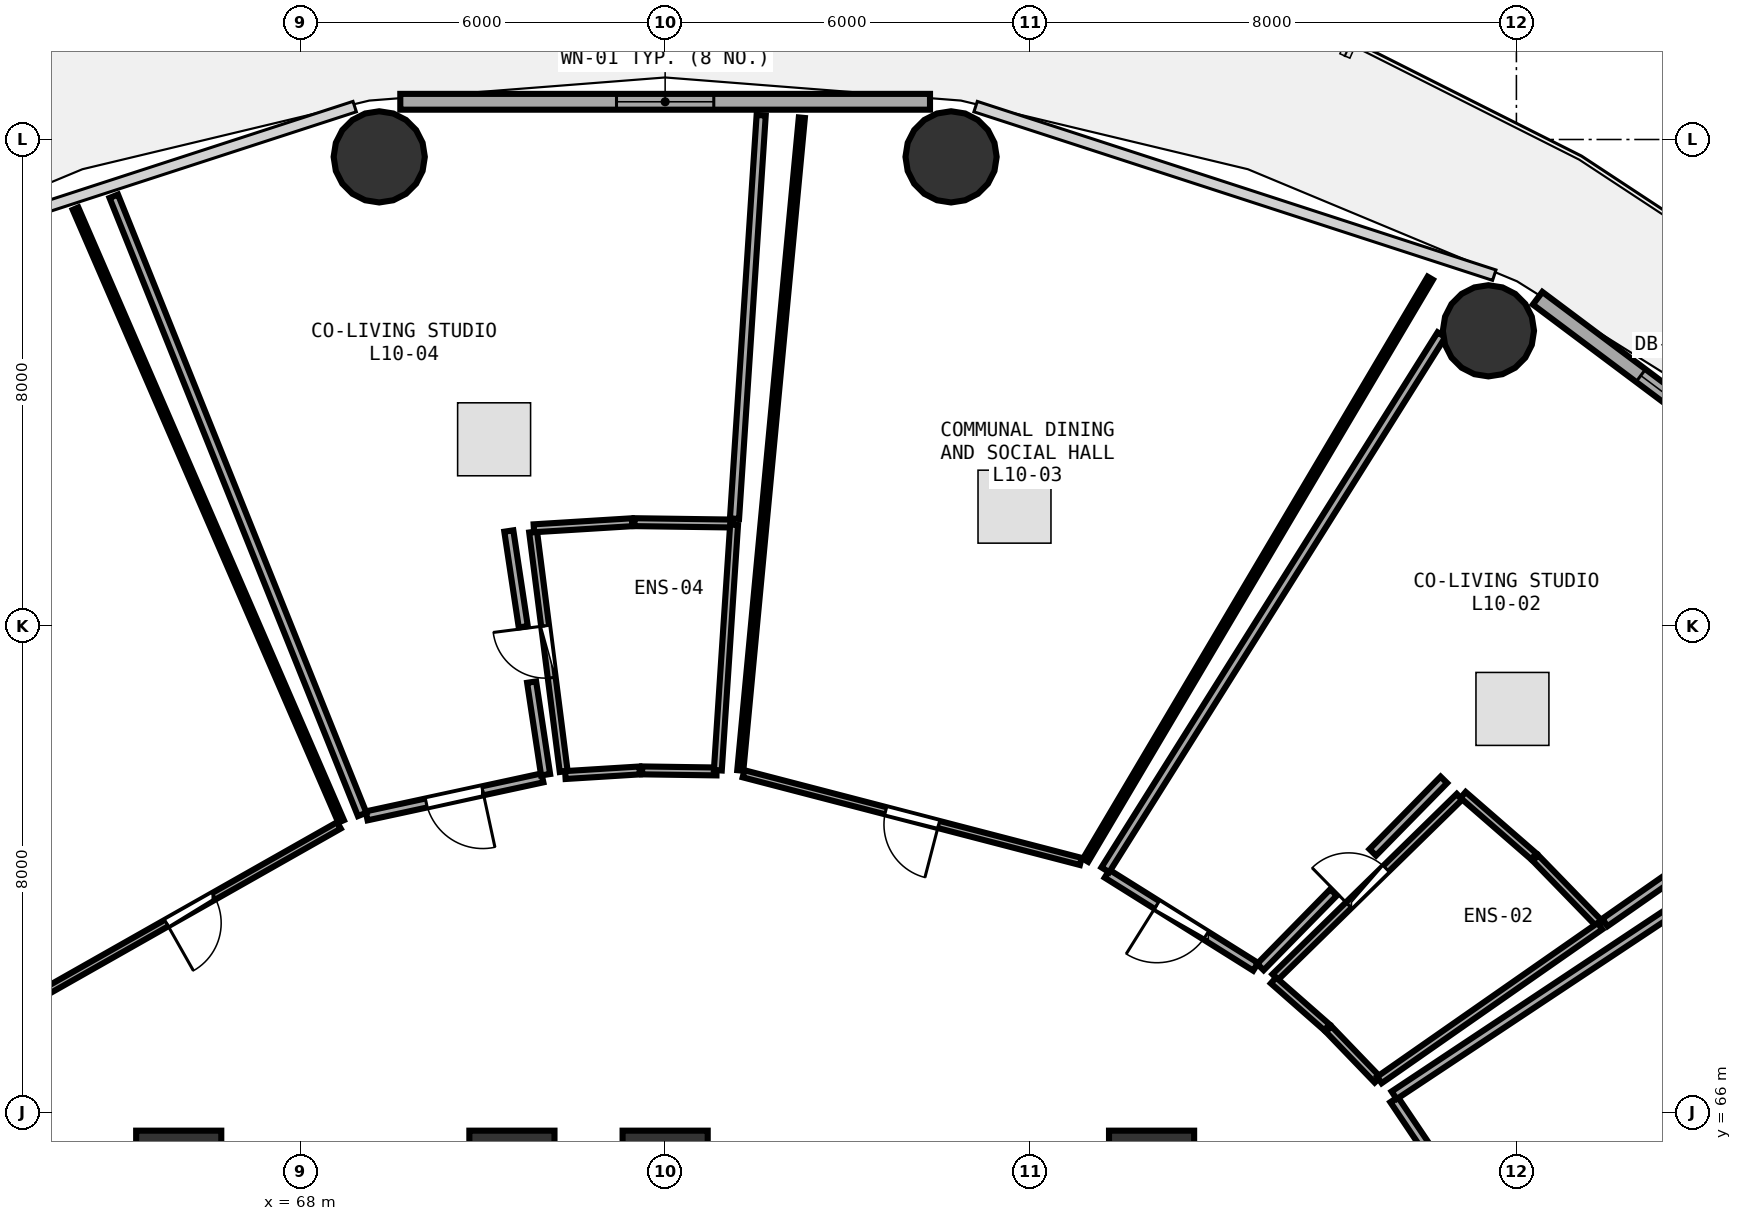
"""IFC4 building model, lengths in metres.
Left out: names, types, materials, properties, quantities, classifications, styles, units other than length and angle.
Written with IfcOpenShell. Run it as: python <this file> out.ifc"""

import sys

from ifc_helpers import new_model, si_unit, direction, frame, frame_2d, origin, origin_2d, place, context, subcontext, project, spatial, rectangle, circle, extrude, element, fill, save


model = new_model("IFC4")
c1 = context("Model", 3, precision=1e-05, world=origin(), true_north=direction((0.0, 1.0)))
c2 = subcontext(c1, "Body", "Model", "MODEL_VIEW")
j1 = project(units=[si_unit("LENGTHUNIT", "METRE"), si_unit("PLANEANGLEUNIT", "RADIAN")], contexts=[c1])
p1 = place(None, origin())
s1 = spatial("IfcSite", under=j1, at=p1, CompositionType="ELEMENT")
p2 = place(p1, origin())
s2 = spatial("IfcBuilding", under=s1, at=p2, CompositionType="ELEMENT")
p3 = place(p2, frame((0.0, 0.0, 41.25)))
s3 = spatial("IfcBuildingStorey", under=s2, at=p3, CompositionType="ELEMENT", Elevation=41.25)
for number, where, z_axis, x_axis in (
    (1, (82.0, 65.0, 0.0), (0.0, 0.0, 1.0), (1.0, 0.0, 0.0)),
    (2, (74.0, 65.0, 0.0), (0.0, 0.0, 1.0), (1.0, 0.0, 0.0)),
    (3, (71.48, 65.0, 0.0), (0.0, 0.0, 1.0), (1.0, 0.0, 0.0)),
    (4, (66.0, 65.0, 0.0), (0.0, 0.0, 1.0), (1.0, 0.0, 0.0)),
):
    element("IfcColumn", number, at=place(p3, frame(where, z_axis=z_axis, x_axis=x_axis)), inside=s3, PredefinedType="PILASTER", context=c2, shape_type="SweptSolid", body=[
        extrude(rectangle(XDim=1.4, YDim=1.4, at=origin_2d()), origin(), (0.0, 0.0, 1.0), 3.75),
    ])
for number, where, z_axis, x_axis in (
    (5, (87.54, 78.854, 0.0), (0.0, 0.0, 1.0), (1.0, 0.0, 0.0)),
    (6, (78.702, 81.714, 0.0), (0.0, 0.0, 1.0), (1.0, 0.0, 0.0)),
    (7, (69.298, 81.714, 0.0), (0.0, 0.0, 1.0), (1.0, 0.0, 0.0)),
):
    element("IfcColumn", number, at=place(p3, frame(where, z_axis=z_axis, x_axis=x_axis)), inside=s3, PredefinedType="COLUMN", context=c2, shape_type="SweptSolid", body=[
        extrude(circle(Radius=0.75, at=origin_2d()), origin(), (0.0, 0.0, 1.0), 3.75),
    ])
p4 = place(p3, frame((94.984, 74.418, 0.0), z_axis=(0.0, 0.0, 1.0), x_axis=(-0.80030733173, 0.599590005569, 0.0)))
e8 = element("IfcWall", 8, at=p4, inside=s3, PredefinedType="SOLIDWALL", context=c2, shape_type="SweptSolid", body=[
    extrude(rectangle(XDim=8.291, YDim=0.26, at=frame_2d((4.145, 0.0))), origin(), (0.0, 0.0, 1.0), 3.475),
])
p5 = place(p4, frame((3.67, 0.0, 0.0)))
e9 = element("IfcOpeningElement", 9, at=p5, cuts=e8, PredefinedType="OPENING", context=c2, shape_type="SweptSolid", body=[
    extrude(rectangle(XDim=0.95, YDim=2.1, at=frame_2d((0.475, 1.05))), frame((0.0, 0.14, 0.0), z_axis=(0.0, -1.0, 0.0), x_axis=(1.0, 0.0, 0.0)), (0.0, 0.0, 1.0), 0.28),
])
p6 = place(p4, frame((4.97, 0.0, 0.85)))
e10 = element("IfcOpeningElement", 10, at=p6, cuts=e8, PredefinedType="OPENING", context=c2, shape_type="SweptSolid", body=[
    extrude(rectangle(XDim=1.2, YDim=1.45, at=frame_2d((0.6, 0.725))), frame((0.0, 0.14, 0.0), z_axis=(0.0, -1.0, 0.0), x_axis=(1.0, 0.0, 0.0)), (0.0, 0.0, 1.0), 0.28),
])
p7 = place(p3, frame((78.356, 82.62, 0.0), z_axis=(0.0, 0.0, 1.0), x_axis=(-1.0, 0.0, 0.0)))
e11 = element("IfcWall", 11, at=p7, inside=s3, PredefinedType="SOLIDWALL", context=c2, shape_type="SweptSolid", body=[
    extrude(rectangle(XDim=8.712, YDim=0.26, at=frame_2d((4.356, 0.0))), origin(), (0.0, 0.0, 1.0), 3.475),
])
p8 = place(p7, frame((3.556, 0.0, 0.85)))
e12 = element("IfcOpeningElement", 12, at=p8, cuts=e11, PredefinedType="OPENING", context=c2, shape_type="SweptSolid", body=[
    extrude(rectangle(XDim=1.6, YDim=1.45, at=frame_2d((0.8, 0.725))), frame((0.0, 0.14, 0.0), z_axis=(0.0, -1.0, 0.0), x_axis=(1.0, 0.0, 0.0)), (0.0, 0.0, 1.0), 0.28),
])
p9 = place(p3, frame((87.533, 63.917, 0.0), z_axis=(0.0, 0.0, 1.0), x_axis=(-0.558444152287, 0.829542119953, 0.0)))
e13 = element("IfcWall", 13, at=p9, inside=s3, PredefinedType="PARTITIONING", context=c2, shape_type="SweptSolid", body=[
    extrude(rectangle(XDim=2.765, YDim=0.15, at=frame_2d((1.382, 0.0))), origin(), (0.0, 0.0, 1.0), 2.875),
])
p10 = place(p9, frame((0.907, 0.0, 0.0)))
e14 = element("IfcOpeningElement", 14, at=p10, cuts=e13, PredefinedType="OPENING", context=c2, shape_type="SweptSolid", body=[
    extrude(rectangle(XDim=0.95, YDim=2.08, at=frame_2d((0.475, 1.04))), frame((0.0, 0.085, 0.0), z_axis=(0.0, -1.0, 0.0), x_axis=(1.0, 0.0, 0.0)), (0.0, 0.0, 1.0), 0.17),
])
p11 = place(p3, frame((84.033, 68.226, 0.0), z_axis=(0.0, 0.0, 1.0), x_axis=(0.714891568972, 0.699235328493, 0.0)))
e15 = element("IfcWall", 15, at=p11, inside=s3, PredefinedType="PLUMBINGWALL", context=c2, shape_type="SweptSolid", body=[
    extrude(rectangle(XDim=4.241, YDim=0.13, at=frame_2d((2.121, 0.0))), origin(), (0.0, 0.0, 1.0), 3.235),
])
p12 = place(p11, frame((1.691, 0.0, 0.0)))
e16 = element("IfcOpeningElement", 16, at=p12, cuts=e15, PredefinedType="OPENING", context=c2, shape_type="SweptSolid", body=[
    extrude(rectangle(XDim=0.86, YDim=2.05, at=frame_2d((0.43, 1.025))), frame((0.0, 0.075, 0.0), z_axis=(0.0, -1.0, 0.0), x_axis=(1.0, 0.0, 0.0)), (0.0, 0.0, 1.0), 0.15),
])
p13 = place(p3, frame((83.711, 68.395, 0.0), z_axis=(0.0, 0.0, 1.0), x_axis=(-0.847522016495, 0.530760239238, 0.0)))
e17 = element("IfcWall", 17, at=p13, inside=s3, PredefinedType="PARTITIONING", context=c2, shape_type="SweptSolid", body=[
    extrude(rectangle(XDim=2.882, YDim=0.15, at=frame_2d((1.441, 0.0))), origin(), (0.0, 0.0, 1.0), 2.875),
])
p14 = place(p13, frame((0.966, 0.0, 0.0)))
e18 = element("IfcOpeningElement", 18, at=p14, cuts=e17, PredefinedType="OPENING", context=c2, shape_type="SweptSolid", body=[
    extrude(rectangle(XDim=0.95, YDim=2.08, at=frame_2d((0.475, 1.04))), frame((0.0, 0.085, 0.0), z_axis=(0.0, -1.0, 0.0), x_axis=(1.0, 0.0, 0.0)), (0.0, 0.0, 1.0), 0.17),
])
p15 = place(p3, frame((80.836, 70.127, 0.0), z_axis=(0.0, 0.0, 1.0), x_axis=(-0.967834541954, 0.251587558119, 0.0)))
e19 = element("IfcWall", 19, at=p15, inside=s3, PredefinedType="PARTITIONING", context=c2, shape_type="SweptSolid", body=[
    extrude(rectangle(XDim=5.73, YDim=0.12, at=frame_2d((2.865, 0.0))), origin(), (0.0, 0.0, 1.0), 2.875),
])
p16 = place(p15, frame((2.415, 0.0, 0.0)))
e20 = element("IfcOpeningElement", 20, at=p16, cuts=e19, PredefinedType="OPENING", context=c2, shape_type="SweptSolid", body=[
    extrude(rectangle(XDim=0.9, YDim=2.08, at=frame_2d((0.45, 1.04))), frame((0.0, 0.07, 0.0), z_axis=(0.0, -1.0, 0.0), x_axis=(1.0, 0.0, 0.0)), (0.0, 0.0, 1.0), 0.14),
])
p17 = place(p3, frame((72.331, 71.606, 0.0), z_axis=(0.0, 0.0, 1.0), x_axis=(-0.126591984802, 0.991954872655, 0.0)))
e21 = element("IfcWall", 21, at=p17, inside=s3, PredefinedType="PLUMBINGWALL", context=c2, shape_type="SweptSolid", body=[
    extrude(rectangle(XDim=3.971, YDim=0.13, at=frame_2d((1.985, 0.0))), origin(), (0.0, 0.0, 1.0), 3.175),
])
p18 = place(p17, frame((1.555, 0.0, 0.0)))
e22 = element("IfcOpeningElement", 22, at=p18, cuts=e21, PredefinedType="OPENING", context=c2, shape_type="SweptSolid", body=[
    extrude(rectangle(XDim=0.86, YDim=2.05, at=frame_2d((0.43, 1.025))), frame((0.0, 0.075, 0.0), z_axis=(0.0, -1.0, 0.0), x_axis=(1.0, 0.0, 0.0)), (0.0, 0.0, 1.0), 0.15),
])
p19 = place(p3, frame((71.981, 71.501, 0.0), z_axis=(0.0, 0.0, 1.0), x_axis=(-0.977451938751, -0.211158015313, 0.0)))
e23 = element("IfcWall", 23, at=p19, inside=s3, PredefinedType="PARTITIONING", context=c2, shape_type="SweptSolid", body=[
    extrude(rectangle(XDim=2.958, YDim=0.15, at=frame_2d((1.479, 0.0))), origin(), (0.0, 0.0, 1.0), 2.875),
])
p20 = place(p19, frame((1.004, 0.0, 0.0)))
e24 = element("IfcOpeningElement", 24, at=p20, cuts=e23, PredefinedType="OPENING", context=c2, shape_type="SweptSolid", body=[
    extrude(rectangle(XDim=0.95, YDim=2.08, at=frame_2d((0.475, 1.04))), frame((0.0, 0.085, 0.0), z_axis=(0.0, -1.0, 0.0), x_axis=(1.0, 0.0, 0.0)), (0.0, 0.0, 1.0), 0.17),
])
p21 = place(p3, frame((68.635, 70.72, 0.0), z_axis=(0.0, 0.0, 1.0), x_axis=(-0.870068136537, -0.49293147372, 0.0)))
e25 = element("IfcWall", 25, at=p21, inside=s3, PredefinedType="PARTITIONING", context=c2, shape_type="SweptSolid", body=[
    extrude(rectangle(XDim=5.621, YDim=0.12, at=frame_2d((2.811, 0.0))), origin(), (0.0, 0.0, 1.0), 2.875),
])
p22 = place(p21, frame((2.36, 0.0, 0.0)))
e26 = element("IfcOpeningElement", 26, at=p22, cuts=e25, PredefinedType="OPENING", context=c2, shape_type="SweptSolid", body=[
    extrude(rectangle(XDim=0.9, YDim=2.08, at=frame_2d((0.45, 1.04))), frame((0.0, 0.07, 0.0), z_axis=(0.0, -1.0, 0.0), x_axis=(1.0, 0.0, 0.0)), (0.0, 0.0, 1.0), 0.14),
])
p23 = place(p3, frame((85.989, 66.282, 0.0), z_axis=(0.0, 0.0, 1.0), x_axis=(0.833114362659, 0.553100767248, 0.0)))
e27 = element("IfcWall", 27, at=p23, inside=s3, PredefinedType="PARTITIONING", context=c2, shape_type="SweptSolid", body=[
    extrude(rectangle(XDim=11.808, YDim=0.15, at=frame_2d((5.904, 0.0))), origin(), (0.0, 0.0, 1.0), 2.875),
])
p24 = place(p3, frame((91.8, 65.626, 0.0), z_axis=(0.0, 0.0, 1.0), x_axis=(-0.92347379334, -0.383661508383, 0.0)))
e28 = element("IfcWall", 28, at=p24, inside=s3, PredefinedType="PARTITIONING", context=c2, shape_type="SweptSolid", body=[
    extrude(rectangle(XDim=1.8, YDim=0.15, at=frame_2d((0.9, 0.0))), origin(), (0.0, 0.0, 1.0), 2.875),
])
p25 = place(p3, frame((85.716, 66.536, 0.0), z_axis=(0.0, 0.0, 1.0), x_axis=(-0.693609314424, 0.720351385745, 0.0)))
e29 = element("IfcWall", 29, at=p25, inside=s3, PredefinedType="PLUMBINGWALL", context=c2, shape_type="SweptSolid", body=[
    extrude(rectangle(XDim=1.159, YDim=0.13, at=frame_2d((0.58, 0.0))), origin(), (0.0, 0.0, 1.0), 2.875),
])
p26 = place(p3, frame((84.883, 67.399, 0.0), z_axis=(0.0, 0.0, 1.0), x_axis=(-0.75116489845, 0.660114607729, 0.0)))
e30 = element("IfcWall", 30, at=p26, inside=s3, PredefinedType="PLUMBINGWALL", context=c2, shape_type="SweptSolid", body=[
    extrude(rectangle(XDim=1.169, YDim=0.13, at=frame_2d((0.584, 0.0))), origin(), (0.0, 0.0, 1.0), 3.48),
])
p27 = place(p3, frame((87.123, 71.221, 0.0), z_axis=(0.0, 0.0, 1.0), x_axis=(0.754783045921, -0.655974506814, 0.0)))
e31 = element("IfcWall", 31, at=p27, inside=s3, PredefinedType="PLUMBINGWALL", context=c2, shape_type="SweptSolid", body=[
    extrude(rectangle(XDim=1.539, YDim=0.13, at=frame_2d((0.77, 0.0))), origin(), (0.0, 0.0, 1.0), 3.48),
])
p28 = place(p3, frame((88.314, 70.184, 0.0), z_axis=(0.0, 0.0, 1.0), x_axis=(0.696872710474, -0.717194830849, 0.0)))
e32 = element("IfcWall", 32, at=p28, inside=s3, PredefinedType="PLUMBINGWALL", context=c2, shape_type="SweptSolid", body=[
    extrude(rectangle(XDim=1.526, YDim=0.13, at=frame_2d((0.763, 0.0))), origin(), (0.0, 0.0, 1.0), 2.875),
])
p29 = place(p3, frame((89.375, 69.064, 0.0), z_axis=(0.0, 0.0, 1.0), x_axis=(-0.820234155097, -0.572027910869, 0.0)))
e33 = element("IfcWall", 33, at=p29, inside=s3, PredefinedType="PLUMBINGWALL", context=c2, shape_type="SweptSolid", body=[
    extrude(rectangle(XDim=4.423, YDim=0.13, at=frame_2d((2.212, 0.0))), origin(), (0.0, 0.0, 1.0), 3.235),
])
p30 = place(p3, frame((81.239, 69.99, 0.0), z_axis=(0.0, 0.0, 1.0), x_axis=(0.531976191107, 0.846759311785, 0.0)))
e34 = element("IfcWall", 34, at=p30, inside=s3, PredefinedType="PARTITIONING", context=c2, shape_type="SweptSolid", body=[
    extrude(rectangle(XDim=10.392, YDim=0.15, at=frame_2d((5.196, 0.0))), origin(), (0.0, 0.0, 1.0), 3.175),
])
p31 = place(p3, frame((94.602, 72.717, 0.0), z_axis=(0.0, 0.0, 1.0), x_axis=(-0.819914684215, -0.572485729611, 0.0)))
e35 = element("IfcWall", 35, at=p31, inside=s3, PredefinedType="PARTITIONING", context=c2, shape_type="SweptSolid", body=[
    extrude(rectangle(XDim=6.277, YDim=0.15, at=frame_2d((3.139, 0.0))), origin(), (0.0, 0.0, 1.0), 3.175),
])
p32 = place(p3, frame((86.807, 71.469, 0.0), z_axis=(0.0, 0.0, 1.0), x_axis=(-0.699982262545, -0.714160228606, 0.0)))
e36 = element("IfcWall", 36, at=p32, inside=s3, PredefinedType="PARTITIONING", context=c2, shape_type="SweptSolid", body=[
    extrude(rectangle(XDim=1.67, YDim=0.15, at=frame_2d((0.835, 0.0))), origin(), (0.0, 0.0, 1.0), 3.48),
])
p33 = place(p3, frame((84.993, 69.619, 0.0), z_axis=(0.0, 0.0, 1.0), x_axis=(-0.69997059614, -0.714171663215, 0.0)))
e37 = element("IfcWall", 37, at=p33, inside=s3, PredefinedType="PARTITIONING", context=c2, shape_type="SweptSolid", body=[
    extrude(rectangle(XDim=1.719, YDim=0.15, at=frame_2d((0.86, 0.0))), origin(), (0.0, 0.0, 1.0), 3.235),
])
p34 = place(p3, frame((75.236, 71.624, 0.0), z_axis=(0.0, 0.0, 1.0), x_axis=(0.093901844858, 0.995581460018, 0.0)))
e38 = element("IfcWall", 38, at=p34, inside=s3, PredefinedType="PARTITIONING", context=c2, shape_type="SweptSolid", body=[
    extrude(rectangle(XDim=10.782, YDim=0.1, at=frame_2d((5.391, 0.0))), origin(), (0.0, 0.0, 1.0), 2.875),
])
p35 = place(p3, frame((86.583, 79.719, 0.0), z_axis=(0.0, 0.0, 1.0), x_axis=(-0.509594840762, -0.860414492131, 0.0)))
e39 = element("IfcWall", 39, at=p35, inside=s3, PredefinedType="PARTITIONING", context=c2, shape_type="SweptSolid", body=[
    extrude(rectangle(XDim=11.125, YDim=0.1, at=frame_2d((5.562, 0.0))), origin(), (0.0, 0.0, 1.0), 2.875),
])
p36 = place(p3, frame((74.845, 71.607, 0.0), z_axis=(0.0, 0.0, 1.0), x_axis=(-0.999899717313, 0.014161755422, 0.0)))
e40 = element("IfcWall", 40, at=p36, inside=s3, PredefinedType="PLUMBINGWALL", context=c2, shape_type="SweptSolid", body=[
    extrude(rectangle(XDim=1.224, YDim=0.13, at=frame_2d((0.612, 0.0))), origin(), (0.0, 0.0, 1.0), 3.48),
])
p37 = place(p3, frame((73.581, 71.624, 0.0), z_axis=(0.0, 0.0, 1.0), x_axis=(-0.998088101555, -0.061807293544, 0.0)))
e41 = element("IfcWall", 41, at=p37, inside=s3, PredefinedType="PLUMBINGWALL", context=c2, shape_type="SweptSolid", body=[
    extrude(rectangle(XDim=1.225, YDim=0.13, at=frame_2d((0.612, 0.0))), origin(), (0.0, 0.0, 1.0), 3.48),
])
p38 = place(p3, frame((71.841, 75.606, 0.0), z_axis=(0.0, 0.0, 1.0), x_axis=(0.99810332164, 0.061561021199, 0.0)))
e42 = element("IfcWall", 42, at=p38, inside=s3, PredefinedType="PLUMBINGWALL", context=c2, shape_type="SweptSolid", body=[
    extrude(rectangle(XDim=1.618, YDim=0.13, at=frame_2d((0.809, 0.0))), origin(), (0.0, 0.0, 1.0), 3.48),
])
p39 = place(p3, frame((73.496, 75.707, 0.0), z_axis=(0.0, 0.0, 1.0), x_axis=(0.999903766804, -0.013872891954, 0.0)))
e43 = element("IfcWall", 43, at=p39, inside=s3, PredefinedType="PLUMBINGWALL", context=c2, shape_type="SweptSolid", body=[
    extrude(rectangle(XDim=1.619, YDim=0.13, at=frame_2d((0.81, 0.0))), origin(), (0.0, 0.0, 1.0), 3.48),
])
p40 = place(p3, frame((75.134, 75.664, 0.0), z_axis=(0.0, 0.0, 1.0), x_axis=(-0.066134527356, -0.997810715663, 0.0)))
e44 = element("IfcWall", 44, at=p40, inside=s3, PredefinedType="PLUMBINGWALL", context=c2, shape_type="SweptSolid", body=[
    extrude(rectangle(XDim=4.046, YDim=0.13, at=frame_2d((2.023, 0.0))), origin(), (0.0, 0.0, 1.0), 3.175),
])
p41 = place(p3, frame((69.017, 70.901, 0.0), z_axis=(0.0, 0.0, 1.0), x_axis=(-0.372877076454, 0.927880749803, 0.0)))
e45 = element("IfcWall", 45, at=p41, inside=s3, PredefinedType="PARTITIONING", context=c2, shape_type="SweptSolid", body=[
    extrude(rectangle(XDim=10.956, YDim=0.15, at=frame_2d((5.478, 0.0))), origin(), (0.0, 0.0, 1.0), 2.875),
])
p42 = place(p3, frame((75.579, 82.399, 0.0), z_axis=(0.0, 0.0, 1.0), x_axis=(-0.065975596533, -0.997821236827, 0.0)))
e46 = element("IfcWall", 46, at=p42, inside=s3, PredefinedType="PARTITIONING", context=c2, shape_type="SweptSolid", body=[
    extrude(rectangle(XDim=6.65, YDim=0.15, at=frame_2d((3.325, 0.0))), origin(), (0.0, 0.0, 1.0), 2.875),
])
p43 = place(p3, frame((71.429, 75.561, 0.0), z_axis=(0.0, 0.0, 1.0), x_axis=(0.149314908759, -0.988789693526, 0.0)))
e47 = element("IfcWall", 47, at=p43, inside=s3, PredefinedType="PARTITIONING", context=c2, shape_type="SweptSolid", body=[
    extrude(rectangle(XDim=1.593, YDim=0.15, at=frame_2d((0.796, 0.0))), origin(), (0.0, 0.0, 1.0), 3.175),
])
p44 = place(p3, frame((71.804, 73.077, 0.0), z_axis=(0.0, 0.0, 1.0), x_axis=(0.149162041114, -0.988812765639, 0.0)))
e48 = element("IfcWall", 48, at=p44, inside=s3, PredefinedType="PARTITIONING", context=c2, shape_type="SweptSolid", body=[
    extrude(rectangle(XDim=1.54, YDim=0.15, at=frame_2d((0.77, 0.0))), origin(), (0.0, 0.0, 1.0), 3.48),
])
p45 = place(p3, frame((64.303, 80.863, 0.0), z_axis=(0.0, 0.0, 1.0), x_axis=(0.397730954589, -0.917502091421, 0.0)))
e49 = element("IfcWall", 49, at=p45, inside=s3, PredefinedType="PARTITIONING", context=c2, shape_type="SweptSolid", body=[
    extrude(rectangle(XDim=10.983, YDim=0.1, at=frame_2d((5.491, 0.0))), origin(), (0.0, 0.0, 1.0), 2.875),
])
p46 = place(p6, origin())
e50 = element("IfcWindow", 50, at=p46, inside=s3, PartitioningType="SINGLE_PANEL", PredefinedType="WINDOW", context=c2, shape_type="SweptSolid", body=[
    extrude(rectangle(XDim=1.2, YDim=1.45, at=frame_2d((0.6, 0.725))), frame((0.0, 0.03, 0.0), z_axis=(0.0, -1.0, 0.0), x_axis=(1.0, 0.0, 0.0)), (0.0, 0.0, 1.0), 0.06),
])
fill(e10, e50)
p47 = place(p8, origin())
e51 = element("IfcWindow", 51, at=p47, inside=s3, PartitioningType="SINGLE_PANEL", PredefinedType="WINDOW", context=c2, shape_type="SweptSolid", body=[
    extrude(rectangle(XDim=1.6, YDim=1.45, at=frame_2d((0.8, 0.725))), frame((0.0, 0.03, 0.0), z_axis=(0.0, -1.0, 0.0), x_axis=(1.0, 0.0, 0.0)), (0.0, 0.0, 1.0), 0.06),
])
fill(e12, e51)
p48 = place(p12, origin())
e52 = element("IfcDoor", 52, at=p48, inside=s3, OperationType="SINGLE_SWING_LEFT", PredefinedType="DOOR", context=c2, shape_type="SweptSolid", body=[
    extrude(rectangle(XDim=0.86, YDim=2.05, at=frame_2d((0.43, 1.025))), frame((0.0, 0.025, 0.0), z_axis=(0.0, -1.0, 0.0), x_axis=(1.0, 0.0, 0.0)), (0.0, 0.0, 1.0), 0.05),
])
fill(e16, e52)
p49 = place(p14, origin())
e53 = element("IfcDoor", 53, at=p49, inside=s3, OperationType="SINGLE_SWING_RIGHT", PredefinedType="DOOR", context=c2, shape_type="SweptSolid", body=[
    extrude(rectangle(XDim=0.95, YDim=2.08, at=frame_2d((0.475, 1.04))), frame((0.0, 0.025, 0.0), z_axis=(0.0, -1.0, 0.0), x_axis=(1.0, 0.0, 0.0)), (0.0, 0.0, 1.0), 0.05),
])
fill(e18, e53)
p50 = place(p16, origin())
e54 = element("IfcDoor", 54, at=p50, inside=s3, OperationType="SINGLE_SWING_LEFT", PredefinedType="DOOR", context=c2, shape_type="SweptSolid", body=[
    extrude(rectangle(XDim=0.9, YDim=2.08, at=frame_2d((0.45, 1.04))), frame((0.0, 0.025, 0.0), z_axis=(0.0, -1.0, 0.0), x_axis=(1.0, 0.0, 0.0)), (0.0, 0.0, 1.0), 0.05),
])
fill(e20, e54)
p51 = place(p18, origin())
e55 = element("IfcDoor", 55, at=p51, inside=s3, OperationType="SINGLE_SWING_RIGHT", PredefinedType="DOOR", context=c2, shape_type="SweptSolid", body=[
    extrude(rectangle(XDim=0.86, YDim=2.05, at=frame_2d((0.43, 1.025))), frame((0.0, 0.025, 0.0), z_axis=(0.0, -1.0, 0.0), x_axis=(1.0, 0.0, 0.0)), (0.0, 0.0, 1.0), 0.05),
])
fill(e22, e55)
p52 = place(p20, origin())
e56 = element("IfcDoor", 56, at=p52, inside=s3, OperationType="SINGLE_SWING_LEFT", PredefinedType="DOOR", context=c2, shape_type="SweptSolid", body=[
    extrude(rectangle(XDim=0.95, YDim=2.08, at=frame_2d((0.475, 1.04))), frame((0.0, 0.025, 0.0), z_axis=(0.0, -1.0, 0.0), x_axis=(1.0, 0.0, 0.0)), (0.0, 0.0, 1.0), 0.05),
])
fill(e24, e56)
p53 = place(p22, origin())
e57 = element("IfcDoor", 57, at=p53, inside=s3, OperationType="SINGLE_SWING_RIGHT", PredefinedType="DOOR", context=c2, shape_type="SweptSolid", body=[
    extrude(rectangle(XDim=0.9, YDim=2.08, at=frame_2d((0.45, 1.04))), frame((0.0, 0.025, 0.0), z_axis=(0.0, -1.0, 0.0), x_axis=(1.0, 0.0, 0.0)), (0.0, 0.0, 1.0), 0.05),
])
fill(e26, e57)
save(model, sys.argv[1])
